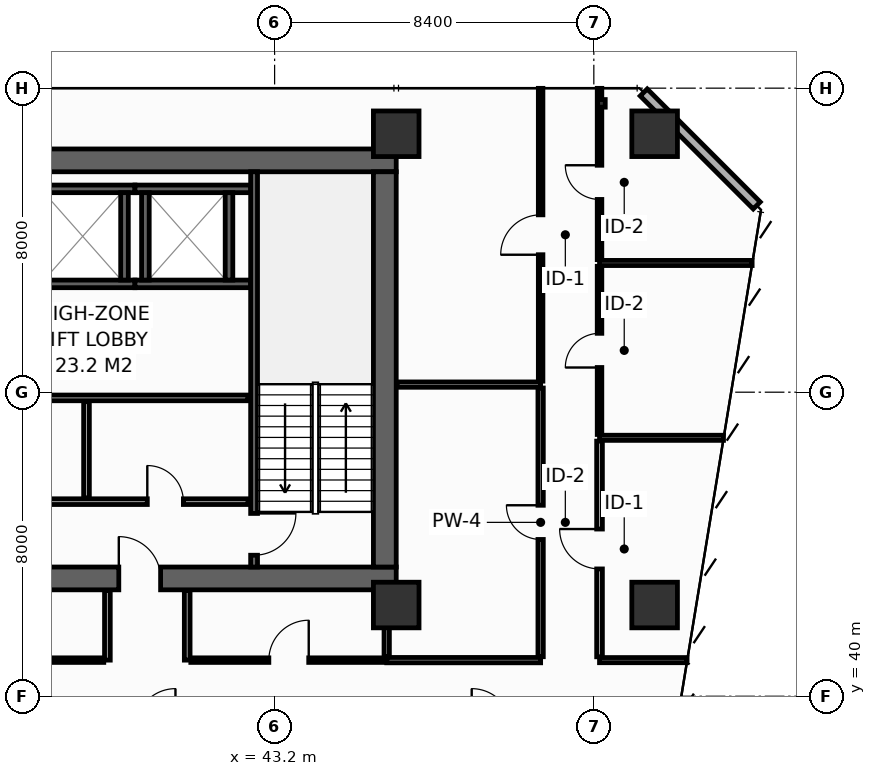
"""IFC4 building model, lengths in metres.
Left out: names, types, materials, properties, quantities, classifications, styles, units other than length and angle.
Written with IfcOpenShell. Run it as: python <this file> out.ifc"""

import sys

from ifc_helpers import new_model, si_unit, direction, frame, frame_2d, origin, origin_2d, place, context, subcontext, project, spatial, rectangle, hollow_rectangle, extrude, element, fill, save


model = new_model("IFC4")
c1 = context("Model", 3, precision=1e-05, world=origin(), true_north=direction((0.0, 1.0)))
c2 = subcontext(c1, "Body", "Model", "MODEL_VIEW")
j1 = project(units=[si_unit("LENGTHUNIT", "METRE"), si_unit("PLANEANGLEUNIT", "RADIAN")], contexts=[c1])
p1 = place(None, origin())
s1 = spatial("IfcSite", under=j1, at=p1, CompositionType="ELEMENT")
p2 = place(p1, origin())
s2 = spatial("IfcBuilding", under=s1, at=p2, CompositionType="ELEMENT")
p3 = place(p2, frame((0.0, 0.0, 51.6)))
s3 = spatial("IfcBuildingStorey", under=s2, at=p3, CompositionType="ELEMENT", Elevation=51.6)
p4 = place(p3, frame((13.5, 43.1, 0.0), z_axis=(0.0, 0.0, 1.0), x_axis=(1.0, 0.0, 0.0)))
e1 = element("IfcWall", 1, at=p4, inside=s3, PredefinedType="SHEAR", context=c2, shape_type="SweptSolid", body=[
    extrude(rectangle(XDim=32.9, YDim=0.6, at=frame_2d((16.45, 0.0))), origin(), (0.0, 0.0, 1.0), 4.15),
])
p5 = place(p4, frame((5.4, 0.0, 0.0)))
e2 = element("IfcOpeningElement", 2, at=p5, cuts=e1, PredefinedType="OPENING", context=c2, shape_type="SweptSolid", body=[
    extrude(rectangle(XDim=1.1, YDim=2.15, at=frame_2d((0.55, 1.075))), frame((0.0, 0.31, 0.0), z_axis=(0.0, -1.0, 0.0), x_axis=(1.0, 0.0, 0.0)), (0.0, 0.0, 1.0), 0.62),
])
p6 = place(p4, frame((25.6, 0.0, 0.0)))
e3 = element("IfcOpeningElement", 3, at=p6, cuts=e1, PredefinedType="OPENING", context=c2, shape_type="SweptSolid", body=[
    extrude(rectangle(XDim=1.1, YDim=2.15, at=frame_2d((0.55, 1.075))), frame((0.0, 0.31, 0.0), z_axis=(0.0, -1.0, 0.0), x_axis=(1.0, 0.0, 0.0)), (0.0, 0.0, 1.0), 0.62),
])
p7 = place(p3, frame((13.5, 54.1, 0.0), z_axis=(0.0, 0.0, 1.0), x_axis=(1.0, 0.0, 0.0)))
e4 = element("IfcWall", 4, at=p7, inside=s3, PredefinedType="SHEAR", context=c2, shape_type="SweptSolid", body=[
    extrude(rectangle(XDim=32.9, YDim=0.6, at=frame_2d((16.45, 0.0))), origin(), (0.0, 0.0, 1.0), 4.15),
])
p8 = place(p3, frame((46.1, 43.4, 0.0), z_axis=(0.0, 0.0, 1.0), x_axis=(0.0, 1.0, 0.0)))
e5 = element("IfcWall", 5, at=p8, inside=s3, PredefinedType="SHEAR", context=c2, shape_type="SweptSolid", body=[
    extrude(rectangle(XDim=10.4, YDim=0.6, at=frame_2d((5.2, 0.0))), origin(), (0.0, 0.0, 1.0), 4.15),
])
for number, where, z_axis, x_axis in (
    (6, (46.4, 54.8, 0.0), (0.0, 0.0, 1.0), (1.0, 0.0, 0.0)),
    (7, (53.2, 54.8, 0.0), (0.0, 0.0, 1.0), (1.0, 0.0, 0.0)),
    (8, (46.4, 42.4, 0.0), (0.0, 0.0, 1.0), (1.0, 0.0, 0.0)),
    (9, (53.2, 42.4, 0.0), (0.0, 0.0, 1.0), (1.0, 0.0, 0.0)),
):
    element("IfcColumn", number, at=place(p3, frame(where, z_axis=z_axis, x_axis=x_axis)), inside=s3, PredefinedType="COLUMN", context=c2, shape_type="SweptSolid", body=[
        extrude(hollow_rectangle(XDim=1.2, YDim=1.2, WallThickness=0.055, at=origin_2d()), origin(), (0.0, 0.0, 1.0), 4.4),
    ])
p9 = place(p3, frame((51.8, 55.6, 0.0), z_axis=(0.0, 0.0, 1.0), x_axis=(1.0, 0.0, 0.0)))
e10 = element("IfcColumn", 10, at=p9, inside=s3, PredefinedType="PILASTER", context=c2, shape_type="SweptSolid", body=[
    extrude(hollow_rectangle(XDim=0.2, YDim=0.2, WallThickness=0.01, at=origin_2d()), origin(), (0.0, 0.0, 1.0), 4.4),
])
for number, where, z_axis, x_axis in (
    (11, (36.775, 50.85, 0.0), (0.0, 0.0, 1.0), (1.0, 0.0, 0.0)),
    (12, (36.775, 53.35, 0.0), (0.0, 0.0, 1.0), (1.0, 0.0, 0.0)),
):
    element("IfcWall", number, at=place(p3, frame(where, z_axis=z_axis, x_axis=x_axis)), inside=s3, PredefinedType="SHEAR", context=c2, shape_type="SweptSolid", body=[
        extrude(rectangle(XDim=2.75, YDim=0.2, at=frame_2d((1.375, 0.0))), origin(), (0.0, 0.0, 1.0), 4.15),
    ])
p10 = place(p3, frame((39.25, 50.95, 0.0), z_axis=(0.0, 0.0, 1.0), x_axis=(0.0, 1.0, 0.0)))
e13 = element("IfcWall", 13, at=p10, inside=s3, PredefinedType="SHEAR", context=c2, shape_type="SweptSolid", body=[
    extrude(rectangle(XDim=2.3, YDim=0.2, at=frame_2d((1.15, 0.0))), origin(), (0.0, 0.0, 1.0), 4.15),
])
for number, where, z_axis, x_axis in (
    (14, (39.525, 50.85, 0.0), (0.0, 0.0, 1.0), (1.0, 0.0, 0.0)),
    (15, (39.525, 53.35, 0.0), (0.0, 0.0, 1.0), (1.0, 0.0, 0.0)),
):
    element("IfcWall", number, at=place(p3, frame(where, z_axis=z_axis, x_axis=x_axis)), inside=s3, PredefinedType="SHEAR", context=c2, shape_type="SweptSolid", body=[
        extrude(rectangle(XDim=3.045, YDim=0.2, at=frame_2d((1.522, 0.0))), origin(), (0.0, 0.0, 1.0), 4.15),
    ])
for number, where, z_axis, x_axis in (
    (16, (39.8, 50.95, 0.0), (0.0, 0.0, 1.0), (0.0, 1.0, 0.0)),
    (17, (42.0, 50.95, 0.0), (0.0, 0.0, 1.0), (0.0, 1.0, 0.0)),
):
    element("IfcWall", number, at=place(p3, frame(where, z_axis=z_axis, x_axis=x_axis)), inside=s3, PredefinedType="SHEAR", context=c2, shape_type="SweptSolid", body=[
        extrude(rectangle(XDim=2.3, YDim=0.2, at=frame_2d((1.15, 0.0))), origin(), (0.0, 0.0, 1.0), 4.15),
    ])
p11 = place(p3, frame((42.66, 53.8, 0.0), z_axis=(0.0, 0.0, 1.0), x_axis=(0.0, -1.0, 0.0)))
e18 = element("IfcWall", 18, at=p11, inside=s3, PredefinedType="SHEAR", context=c2, shape_type="SweptSolid", body=[
    extrude(rectangle(XDim=10.4, YDim=0.18, at=frame_2d((5.2, 0.0))), origin(), (0.0, 0.0, 1.0), 4.15),
])
p12 = place(p11, frame((8.99, 0.0, 0.0)))
e19 = element("IfcOpeningElement", 19, at=p12, cuts=e18, PredefinedType="OPENING", context=c2, shape_type="SweptSolid", body=[
    extrude(rectangle(XDim=1.1, YDim=2.15, at=frame_2d((0.55, 1.075))), frame((0.0, 0.1, 0.0), z_axis=(0.0, -1.0, 0.0), x_axis=(1.0, 0.0, 0.0)), (0.0, 0.0, 1.0), 0.2),
])
p13 = place(p3, frame((34.05, 45.12, 0.0), z_axis=(0.0, 0.0, 1.0), x_axis=(1.0, 0.0, 0.0)))
e20 = element("IfcWall", 20, at=p13, inside=s3, PredefinedType="PARTITIONING", context=c2, shape_type="SweptSolid", body=[
    extrude(rectangle(XDim=8.45, YDim=0.15, at=frame_2d((4.225, 0.0))), origin(), (0.0, 0.0, 1.0), 4.15),
])
p14 = place(p13, frame((1.5, 0.0, 0.0)))
e21 = element("IfcOpeningElement", 21, at=p14, cuts=e20, PredefinedType="OPENING", context=c2, shape_type="SweptSolid", body=[
    extrude(rectangle(XDim=0.95, YDim=2.15, at=frame_2d((0.475, 1.075))), frame((0.0, 0.085, 0.0), z_axis=(0.0, -1.0, 0.0), x_axis=(1.0, 0.0, 0.0)), (0.0, 0.0, 1.0), 0.17),
])
p15 = place(p13, frame((5.8, 0.0, 0.0)))
e22 = element("IfcOpeningElement", 22, at=p15, cuts=e20, PredefinedType="OPENING", context=c2, shape_type="SweptSolid", body=[
    extrude(rectangle(XDim=0.95, YDim=2.15, at=frame_2d((0.475, 1.075))), frame((0.0, 0.085, 0.0), z_axis=(0.0, -1.0, 0.0), x_axis=(1.0, 0.0, 0.0)), (0.0, 0.0, 1.0), 0.17),
])
p16 = place(p3, frame((34.05, 47.85, 0.0), z_axis=(0.0, 0.0, 1.0), x_axis=(1.0, 0.0, 0.0)))
e23 = element("IfcWall", 23, at=p16, inside=s3, PredefinedType="PARTITIONING", context=c2, shape_type="SweptSolid", body=[
    extrude(rectangle(XDim=8.45, YDim=0.15, at=frame_2d((4.225, 0.0))), origin(), (0.0, 0.0, 1.0), 4.15),
])
p17 = place(p3, frame((38.25, 45.22, 0.0), z_axis=(0.0, 0.0, 1.0), x_axis=(0.0, 1.0, 0.0)))
e24 = element("IfcWall", 24, at=p17, inside=s3, PredefinedType="PARTITIONING", context=c2, shape_type="SweptSolid", body=[
    extrude(rectangle(XDim=2.53, YDim=0.15, at=frame_2d((1.265, 0.0))), origin(), (0.0, 0.0, 1.0), 4.15),
])
p18 = place(p3, frame((55.887, 52.913, 0.0), z_axis=(0.0, 0.0, 1.0), x_axis=(-0.707106781187, 0.707106781187, 0.0)))
e25 = element("IfcWall", 25, at=p18, inside=s3, PredefinedType="STANDARD", context=c2, shape_type="SweptSolid", body=[
    extrude(rectangle(XDim=4.206, YDim=0.26, at=frame_2d((2.103, 0.0))), origin(), (0.0, 0.0, 1.0), 4.15),
])
p19 = place(p3, frame((46.15, 40.95, 0.0), z_axis=(0.0, 0.0, 1.0), x_axis=(1.0, 0.0, 0.0)))
e26 = element("IfcWall", 26, at=p19, inside=s3, PredefinedType="PARTITIONING", context=c2, shape_type="SweptSolid", body=[
    extrude(rectangle(XDim=4.05, YDim=0.14, at=frame_2d((2.025, 0.0))), origin(), (0.0, 0.0, 1.0), 4.15),
])
p20 = place(p3, frame((46.15, 41.04, 0.0), z_axis=(0.0, 0.0, 1.0), x_axis=(0.0, 1.0, 0.0)))
e27 = element("IfcWall", 27, at=p20, inside=s3, PredefinedType="PARTITIONING", context=c2, shape_type="SweptSolid", body=[
    extrude(rectangle(XDim=1.74, YDim=0.14, at=frame_2d((0.87, 0.0))), origin(), (0.0, 0.0, 1.0), 4.15),
])
p21 = place(p3, frame((46.42, 48.2, 0.0), z_axis=(0.0, 0.0, 1.0), x_axis=(1.0, 0.0, 0.0)))
e28 = element("IfcWall", 28, at=p21, inside=s3, PredefinedType="PARTITIONING", context=c2, shape_type="SweptSolid", body=[
    extrude(rectangle(XDim=3.78, YDim=0.14, at=frame_2d((1.89, 0.0))), origin(), (0.0, 0.0, 1.0), 4.15),
])
p22 = place(p3, frame((50.2, 41.04, 0.0), z_axis=(0.0, 0.0, 1.0), x_axis=(0.0, 1.0, 0.0)))
e29 = element("IfcWall", 29, at=p22, inside=s3, PredefinedType="PARTITIONING", context=c2, shape_type="SweptSolid", body=[
    extrude(rectangle(XDim=7.07, YDim=0.14, at=frame_2d((3.535, 0.0))), origin(), (0.0, 0.0, 1.0), 3.335),
])
p23 = place(p22, frame((3.085, 0.0, 0.0)))
e30 = element("IfcOpeningElement", 30, at=p23, cuts=e29, PredefinedType="OPENING", context=c2, shape_type="SweptSolid", body=[
    extrude(rectangle(XDim=0.9, YDim=2.1, at=frame_2d((0.45, 1.05))), frame((0.0, 0.08, 0.0), z_axis=(0.0, -1.0, 0.0), x_axis=(1.0, 0.0, 0.0)), (0.0, 0.0, 1.0), 0.16),
])
p24 = place(p3, frame((50.2, 48.29, 0.0), z_axis=(0.0, 0.0, 1.0), x_axis=(0.0, 1.0, 0.0)))
e31 = element("IfcWall", 31, at=p24, inside=s3, PredefinedType="PARTITIONING", context=c2, shape_type="SweptSolid", body=[
    extrude(rectangle(XDim=7.705, YDim=0.12, at=frame_2d((3.853, 0.0))), origin(), (0.0, 0.0, 1.0), 3.435),
])
p25 = place(p24, frame((3.327, 0.0, 0.0)))
e32 = element("IfcOpeningElement", 32, at=p25, cuts=e31, PredefinedType="OPENING", context=c2, shape_type="SweptSolid", body=[
    extrude(rectangle(XDim=1.05, YDim=2.15, at=frame_2d((0.525, 1.075))), frame((0.0, 0.07, 0.0), z_axis=(0.0, -1.0, 0.0), x_axis=(1.0, 0.0, 0.0)), (0.0, 0.0, 1.0), 0.14),
])
p26 = place(p3, frame((51.75, 40.95, 0.0), z_axis=(0.0, 0.0, 1.0), x_axis=(1.0, 0.0, 0.0)))
e33 = element("IfcWall", 33, at=p26, inside=s3, PredefinedType="PARTITIONING", context=c2, shape_type="SweptSolid", body=[
    extrude(rectangle(XDim=2.303, YDim=0.135, at=frame_2d((1.151, 0.0))), origin(), (0.0, 0.0, 1.0), 3.635),
])
p27 = place(p3, frame((51.75, 46.8, 0.0), z_axis=(0.0, 0.0, 1.0), x_axis=(1.0, 0.0, 0.0)))
e34 = element("IfcWall", 34, at=p27, inside=s3, PredefinedType="PARTITIONING", context=c2, shape_type="SweptSolid", body=[
    extrude(rectangle(XDim=3.262, YDim=0.135, at=frame_2d((1.631, 0.0))), origin(), (0.0, 0.0, 1.0), 3.335),
])
p28 = place(p3, frame((51.75, 51.4, 0.0), z_axis=(0.0, 0.0, 1.0), x_axis=(1.0, 0.0, 0.0)))
e35 = element("IfcWall", 35, at=p28, inside=s3, PredefinedType="PARTITIONING", context=c2, shape_type="SweptSolid", body=[
    extrude(rectangle(XDim=4.015, YDim=0.135, at=frame_2d((2.008, 0.0))), origin(), (0.0, 0.0, 1.0), 3.335),
])
p29 = place(p3, frame((51.75, 41.038, 0.0), z_axis=(0.0, 0.0, 1.0), x_axis=(0.0, 1.0, 0.0)))
e36 = element("IfcWall", 36, at=p29, inside=s3, PredefinedType="PARTITIONING", context=c2, shape_type="SweptSolid", body=[
    extrude(rectangle(XDim=5.675, YDim=0.15, at=frame_2d((2.837, 0.0))), origin(), (0.0, 0.0, 1.0), 3.335),
])
p30 = place(p29, frame((2.312, 0.0, 0.0)))
e37 = element("IfcOpeningElement", 37, at=p30, cuts=e36, PredefinedType="OPENING", context=c2, shape_type="SweptSolid", body=[
    extrude(rectangle(XDim=1.05, YDim=2.15, at=frame_2d((0.525, 1.075))), frame((0.0, 0.085, 0.0), z_axis=(0.0, -1.0, 0.0), x_axis=(1.0, 0.0, 0.0)), (0.0, 0.0, 1.0), 0.17),
])
p31 = place(p3, frame((51.75, 46.887, 0.0), z_axis=(0.0, 0.0, 1.0), x_axis=(0.0, 1.0, 0.0)))
e38 = element("IfcWall", 38, at=p31, inside=s3, PredefinedType="PARTITIONING", context=c2, shape_type="SweptSolid", body=[
    extrude(rectangle(XDim=4.425, YDim=0.12, at=frame_2d((2.212, 0.0))), origin(), (0.0, 0.0, 1.0), 4.15),
])
p32 = place(p31, frame((1.762, 0.0, 0.0)))
e39 = element("IfcOpeningElement", 39, at=p32, cuts=e38, PredefinedType="OPENING", context=c2, shape_type="SweptSolid", body=[
    extrude(rectangle(XDim=0.9, YDim=2.1, at=frame_2d((0.45, 1.05))), frame((0.0, 0.07, 0.0), z_axis=(0.0, -1.0, 0.0), x_axis=(1.0, 0.0, 0.0)), (0.0, 0.0, 1.0), 0.14),
])
p33 = place(p3, frame((51.75, 51.488, 0.0), z_axis=(0.0, 0.0, 1.0), x_axis=(0.0, 1.0, 0.0)))
e40 = element("IfcWall", 40, at=p33, inside=s3, PredefinedType="PARTITIONING", context=c2, shape_type="SweptSolid", body=[
    extrude(rectangle(XDim=4.508, YDim=0.12, at=frame_2d((2.254, 0.0))), origin(), (0.0, 0.0, 1.0), 3.435),
])
p34 = place(p33, frame((1.584, 0.0, 0.0)))
e41 = element("IfcOpeningElement", 41, at=p34, cuts=e40, PredefinedType="OPENING", context=c2, shape_type="SweptSolid", body=[
    extrude(rectangle(XDim=0.9, YDim=2.1, at=frame_2d((0.45, 1.05))), frame((0.0, 0.07, 0.0), z_axis=(0.0, -1.0, 0.0), x_axis=(1.0, 0.0, 0.0)), (0.0, 0.0, 1.0), 0.14),
])
for number, where, z_axis, x_axis in (
    (42, (38.8, 40.95, 0.0), (0.0, 0.0, 1.0), (0.0, 1.0, 0.0)),
    (43, (40.9, 40.95, 0.0), (0.0, 0.0, 1.0), (0.0, 1.0, 0.0)),
):
    element("IfcWall", number, at=place(p3, frame(where, z_axis=z_axis, x_axis=x_axis)), inside=s3, PredefinedType="PARTITIONING", context=c2, shape_type="SweptSolid", body=[
        extrude(rectangle(XDim=1.83, YDim=0.15, at=frame_2d((0.915, 0.0))), origin(), (0.0, 0.0, 1.0), 4.15),
    ])
p35 = place(p3, frame((30.08, 40.95, 0.0), z_axis=(0.0, 0.0, 1.0), x_axis=(1.0, 0.0, 0.0)))
e44 = element("IfcWall", 44, at=p35, inside=s3, PredefinedType="PARTITIONING", context=c2, shape_type="SweptSolid", body=[
    extrude(rectangle(XDim=8.625, YDim=0.12, at=frame_2d((4.312, 0.0))), origin(), (0.0, 0.0, 1.0), 3.335),
])
p36 = place(p35, frame((3.862, 0.0, 0.0)))
e45 = element("IfcOpeningElement", 45, at=p36, cuts=e44, PredefinedType="OPENING", context=c2, shape_type="SweptSolid", body=[
    extrude(rectangle(XDim=0.9, YDim=2.1, at=frame_2d((0.45, 1.05))), frame((0.0, 0.07, 0.0), z_axis=(0.0, -1.0, 0.0), x_axis=(1.0, 0.0, 0.0)), (0.0, 0.0, 1.0), 0.14),
])
p37 = place(p3, frame((40.995, 40.95, 0.0), z_axis=(0.0, 0.0, 1.0), x_axis=(1.0, 0.0, 0.0)))
e46 = element("IfcWall", 46, at=p37, inside=s3, PredefinedType="PARTITIONING", context=c2, shape_type="SweptSolid", body=[
    extrude(rectangle(XDim=5.155, YDim=0.12, at=frame_2d((2.577, 0.0))), origin(), (0.0, 0.0, 1.0), 4.15),
])
p38 = place(p37, frame((2.053, 0.0, 0.0)))
e47 = element("IfcOpeningElement", 47, at=p38, cuts=e46, PredefinedType="OPENING", context=c2, shape_type="SweptSolid", body=[
    extrude(rectangle(XDim=1.05, YDim=2.15, at=frame_2d((0.525, 1.075))), frame((0.0, 0.07, 0.0), z_axis=(0.0, -1.0, 0.0), x_axis=(1.0, 0.0, 0.0)), (0.0, 0.0, 1.0), 0.14),
])
p39 = place(p12, origin())
e48 = element("IfcDoor", 48, at=p39, inside=s3, OperationType="SINGLE_SWING_LEFT", PredefinedType="DOOR", context=c2, shape_type="SweptSolid", body=[
    extrude(rectangle(XDim=1.1, YDim=2.15, at=frame_2d((0.55, 1.075))), frame((0.0, 0.025, 0.0), z_axis=(0.0, -1.0, 0.0), x_axis=(1.0, 0.0, 0.0)), (0.0, 0.0, 1.0), 0.05),
])
fill(e19, e48)
p40 = place(p6, origin())
e49 = element("IfcDoor", 49, at=p40, inside=s3, OperationType="SINGLE_SWING_LEFT", PredefinedType="DOOR", context=c2, shape_type="SweptSolid", body=[
    extrude(rectangle(XDim=1.1, YDim=2.15, at=frame_2d((0.55, 1.075))), frame((0.0, 0.025, 0.0), z_axis=(0.0, -1.0, 0.0), x_axis=(1.0, 0.0, 0.0)), (0.0, 0.0, 1.0), 0.05),
])
fill(e3, e49)
p41 = place(p15, origin())
e50 = element("IfcDoor", 50, at=p41, inside=s3, OperationType="SINGLE_SWING_LEFT", PredefinedType="DOOR", context=c2, shape_type="SweptSolid", body=[
    extrude(rectangle(XDim=0.95, YDim=2.15, at=frame_2d((0.475, 1.075))), frame((0.0, 0.025, 0.0), z_axis=(0.0, -1.0, 0.0), x_axis=(1.0, 0.0, 0.0)), (0.0, 0.0, 1.0), 0.05),
])
fill(e22, e50)
p42 = place(p23, origin())
e51 = element("IfcDoor", 51, at=p42, inside=s3, OperationType="SINGLE_SWING_RIGHT", PredefinedType="DOOR", context=c2, shape_type="SweptSolid", body=[
    extrude(rectangle(XDim=0.9, YDim=2.1, at=frame_2d((0.45, 1.05))), frame((0.0, 0.025, 0.0), z_axis=(0.0, -1.0, 0.0), x_axis=(1.0, 0.0, 0.0)), (0.0, 0.0, 1.0), 0.05),
])
fill(e30, e51)
p43 = place(p25, origin())
e52 = element("IfcDoor", 52, at=p43, inside=s3, OperationType="SINGLE_SWING_LEFT", PredefinedType="DOOR", context=c2, shape_type="SweptSolid", body=[
    extrude(rectangle(XDim=1.05, YDim=2.15, at=frame_2d((0.525, 1.075))), frame((0.0, 0.025, 0.0), z_axis=(0.0, -1.0, 0.0), x_axis=(1.0, 0.0, 0.0)), (0.0, 0.0, 1.0), 0.05),
])
fill(e32, e52)
p44 = place(p30, origin())
e53 = element("IfcDoor", 53, at=p44, inside=s3, OperationType="SINGLE_SWING_RIGHT", PredefinedType="DOOR", context=c2, shape_type="SweptSolid", body=[
    extrude(rectangle(XDim=1.05, YDim=2.15, at=frame_2d((0.525, 1.075))), frame((0.0, 0.025, 0.0), z_axis=(0.0, -1.0, 0.0), x_axis=(1.0, 0.0, 0.0)), (0.0, 0.0, 1.0), 0.05),
])
fill(e37, e53)
p45 = place(p32, origin())
e54 = element("IfcDoor", 54, at=p45, inside=s3, OperationType="SINGLE_SWING_LEFT", PredefinedType="DOOR", context=c2, shape_type="SweptSolid", body=[
    extrude(rectangle(XDim=0.9, YDim=2.1, at=frame_2d((0.45, 1.05))), frame((0.0, 0.025, 0.0), z_axis=(0.0, -1.0, 0.0), x_axis=(1.0, 0.0, 0.0)), (0.0, 0.0, 1.0), 0.05),
])
fill(e39, e54)
p46 = place(p34, origin())
e55 = element("IfcDoor", 55, at=p46, inside=s3, OperationType="SINGLE_SWING_RIGHT", PredefinedType="DOOR", context=c2, shape_type="SweptSolid", body=[
    extrude(rectangle(XDim=0.9, YDim=2.1, at=frame_2d((0.45, 1.05))), frame((0.0, 0.025, 0.0), z_axis=(0.0, -1.0, 0.0), x_axis=(1.0, 0.0, 0.0)), (0.0, 0.0, 1.0), 0.05),
])
fill(e41, e55)
p47 = place(p38, origin())
e56 = element("IfcDoor", 56, at=p47, inside=s3, OperationType="SINGLE_SWING_RIGHT", PredefinedType="DOOR", context=c2, shape_type="SweptSolid", body=[
    extrude(rectangle(XDim=1.05, YDim=2.15, at=frame_2d((0.525, 1.075))), frame((0.0, 0.025, 0.0), z_axis=(0.0, -1.0, 0.0), x_axis=(1.0, 0.0, 0.0)), (0.0, 0.0, 1.0), 0.05),
])
fill(e47, e56)
save(model, sys.argv[1])
